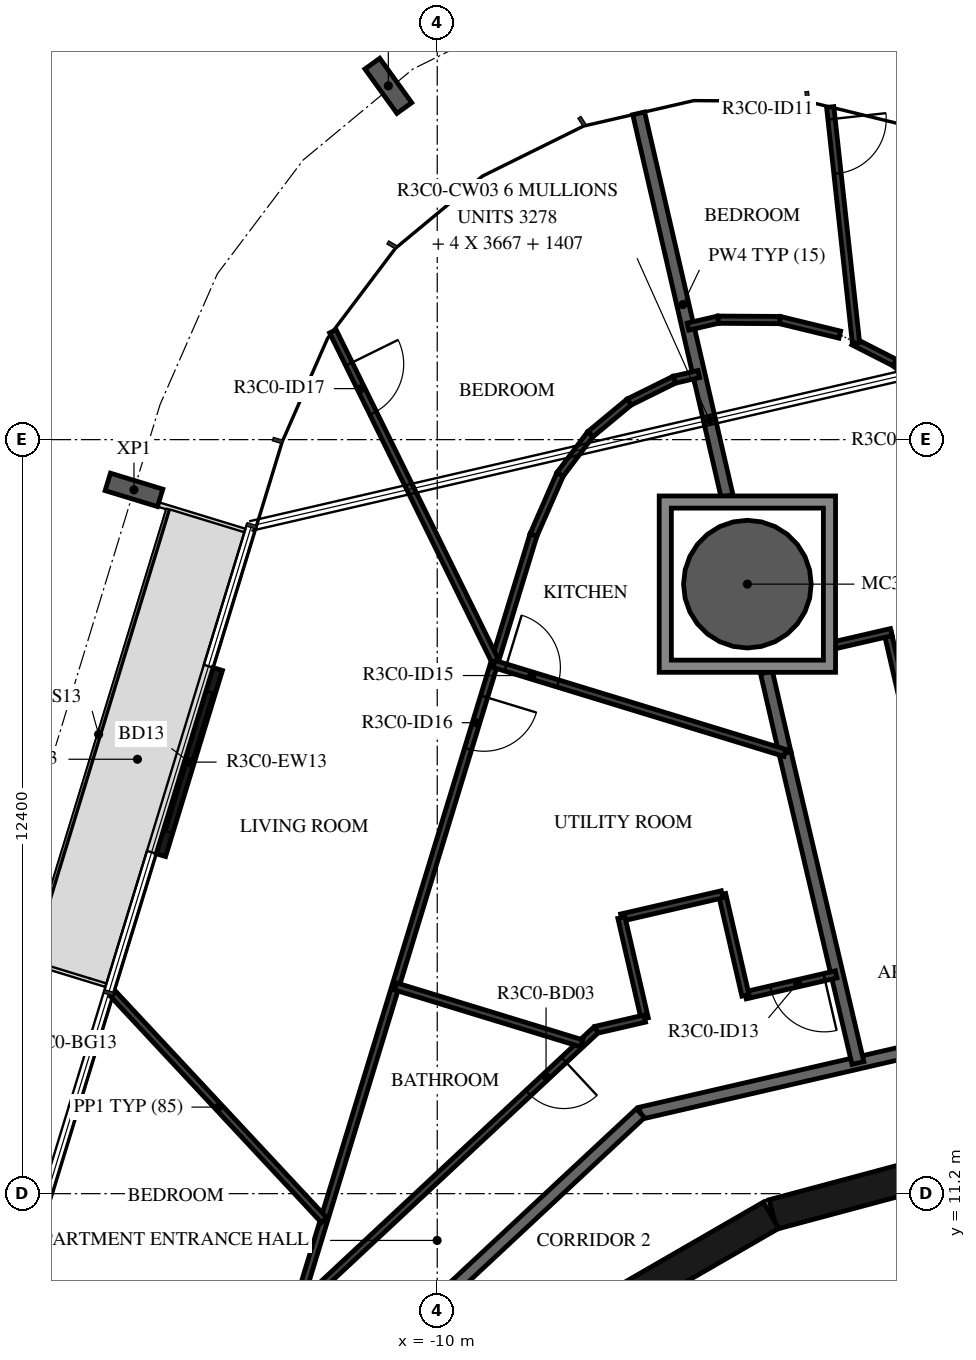
"""IFC4 building model, lengths in metres.
Left out: names, types, materials, properties, quantities, classifications, styles, units other than length and angle.
Written with IfcOpenShell. Run it as: python <this file> out.ifc"""

import sys

from ifc_helpers import new_model, si_unit, direction, frame, frame_2d, origin, origin_2d, place, context, subcontext, project, spatial, polyline, rectangle, hollow_circle, i_section, outline, extrude, element, fill, save


model = new_model("IFC4")
c1 = context("Model", 3, precision=1e-05, world=origin(), true_north=direction((0.0, 1.0)))
c2 = subcontext(c1, "Body", "Model", "MODEL_VIEW")
j1 = project(units=[si_unit("LENGTHUNIT", "METRE"), si_unit("PLANEANGLEUNIT", "RADIAN")], contexts=[c1])
p1 = place(None, origin())
s1 = spatial("IfcSite", under=j1, at=p1, CompositionType="ELEMENT")
p2 = place(p1, origin())
s2 = spatial("IfcBuilding", under=s1, at=p2, CompositionType="ELEMENT")
p3 = place(p2, frame((0.0, 0.0, 141.4)))
s3 = spatial("IfcBuildingStorey", under=s2, at=p3, CompositionType="ELEMENT", Elevation=141.4)
p4 = place(p3, frame((-4.9, 21.223, -0.38), z_axis=(0.0, 0.0, 1.0), x_axis=(1.0, 0.0, 0.0)))
e1 = element("IfcColumn", 1, at=p4, inside=s3, PredefinedType="COLUMN", context=c2, shape_type="SweptSolid", body=[
    extrude(hollow_circle(Radius=1.05, WallThickness=0.05, at=origin_2d()), origin(), (0.0, 0.0, 1.0), 2.576),
])
for number, where, z_axis, x_axis in (
    (2, (-10.804, 29.418, -0.38), (0.0, 0.0, 1.0), (0.811, 0.585, 0.0)),
    (3, (-14.987, 22.773, -0.38), (0.0, 0.0, 1.0), (0.292, 0.956, 0.0)),
):
    element("IfcColumn", number, at=place(p3, frame(where, z_axis=z_axis, x_axis=x_axis)), inside=s3, PredefinedType="COLUMN", context=c2, shape_type="SweptSolid", body=[
        extrude(i_section(OverallWidth=0.3, OverallDepth=0.9, WebThickness=0.019, FlangeThickness=0.035, FilletRadius=0.03, at=origin_2d()), origin(), (0.0, 0.0, 1.0), 2.616),
    ])
p5 = place(p3, frame((-13.609, 19.827, 0.0), z_axis=(0.0, 0.0, 1.0), x_axis=(-0.292348395078, -0.956311882126, 0.0)))
e4 = element("IfcWall", 4, at=p5, inside=s3, PredefinedType="STANDARD", context=c2, shape_type="SweptSolid", body=[
    extrude(rectangle(XDim=3.2, YDim=0.16, at=frame_2d((1.6, 0.0))), origin(), (0.0, 0.0, 1.0), 3.05),
])
p6 = place(p5, frame((0.4, 0.0, 0.0)))
e5 = element("IfcOpeningElement", 5, at=p6, cuts=e4, PredefinedType="OPENING", context=c2, shape_type="SweptSolid", body=[
    extrude(rectangle(XDim=2.4, YDim=2.4, at=frame_2d((1.2, 1.2))), frame((0.0, 0.09, 0.0), z_axis=(0.0, -1.0, 0.0), x_axis=(1.0, 0.0, 0.0)), (0.0, 0.0, 1.0), 0.18),
])
for number, where, z_axis, x_axis in (
    (6, (-1.55, 11.643, 0.0), (0.0, 0.0, 1.0), (-0.966, -0.259, 0.0)),
    (7, (-4.51, 10.845, 0.0), (0.0, 0.0, 1.0), (-0.866, -0.5, 0.0)),
):
    element("IfcWall", number, at=place(p3, frame(where, z_axis=z_axis, x_axis=x_axis)), inside=s3, PredefinedType="SHEAR", context=c2, shape_type="SweptSolid", body=[
        extrude(rectangle(XDim=3.033, YDim=0.5, at=frame_2d((1.516, 0.0))), origin(), (0.0, 0.0, 1.0), 3.05),
    ])
p7 = place(p3, frame((0.495, 14.175, 0.0), z_axis=(0.0, 0.0, 1.0), x_axis=(-0.974376622151, -0.224922649383, 0.0)))
e8 = element("IfcWall", 8, at=p7, inside=s3, PredefinedType="STANDARD", context=c2, shape_type="SweptSolid", body=[
    extrude(rectangle(XDim=7.342, YDim=0.2, at=frame_2d((3.671, 0.0))), origin(), (0.0, 0.0, 1.0), 3.05),
])
p8 = place(p3, frame((-6.659, 12.523, 0.0), z_axis=(0.0, 0.0, 1.0), x_axis=(-0.731350455479, -0.682001841105, 0.0)))
e9 = element("IfcWall", 9, at=p8, inside=s3, PredefinedType="STANDARD", context=c2, shape_type="SweptSolid", body=[
    extrude(rectangle(XDim=7.342, YDim=0.2, at=frame_2d((3.671, 0.0))), origin(), (0.0, 0.0, 1.0), 3.05),
])
p9 = place(p8, frame((4.2, 0.0, 0.0)))
e10 = element("IfcOpeningElement", 10, at=p9, cuts=e9, PredefinedType="OPENING", context=c2, shape_type="SweptSolid", body=[
    extrude(rectangle(XDim=1.0, YDim=2.1, at=frame_2d((0.5, 1.05))), frame((0.0, 0.11, 0.0), z_axis=(0.0, -1.0, 0.0), x_axis=(1.0, 0.0, 0.0)), (0.0, 0.0, 1.0), 0.22),
])
p10 = place(p3, frame((-4.281, 18.448, 0.0), z_axis=(0.0, 0.0, 1.0), x_axis=(0.228867856942, -0.973457499873, 0.0)))
e11 = element("IfcWall", 11, at=p10, inside=s3, PredefinedType="STANDARD", context=c2, shape_type="SweptSolid", body=[
    extrude(rectangle(XDim=5.238, YDim=0.2, at=frame_2d((2.619, 0.0))), origin(), (0.0, 0.0, 1.0), 3.05),
])
p11 = place(p3, frame((-4.586, 19.771, 0.0), z_axis=(0.0, 0.0, 1.0), x_axis=(0.224898895484, -0.974382105136, 0.0)))
e12 = element("IfcWall", 12, at=p11, inside=s3, PredefinedType="STANDARD", context=c2, shape_type="SweptSolid", body=[
    extrude(rectangle(XDim=1.358, YDim=0.2, at=frame_2d((0.679, 0.0))), origin(), (0.0, 0.0, 1.0), 3.05),
])
p12 = place(p3, frame((-6.687, 28.966, 0.0), z_axis=(0.0, 0.0, 1.0), x_axis=(0.224945100086, -0.974371439415, 0.0)))
e13 = element("IfcWall", 13, at=p12, inside=s3, PredefinedType="STANDARD", context=c2, shape_type="SweptSolid", body=[
    extrude(rectangle(XDim=6.458, YDim=0.2, at=frame_2d((3.229, 0.0))), origin(), (0.0, 0.0, 1.0), 3.05),
])
p13 = place(p3, frame((-1.404, 15.276, 0.0), z_axis=(0.0, 0.0, 1.0), x_axis=(-0.224947305813, 0.974370930194, 0.0)))
e14 = element("IfcWall", 14, at=p13, inside=s3, PredefinedType="PARTITIONING", context=c2, shape_type="SweptSolid", body=[
    extrude(rectangle(XDim=5.28, YDim=0.12, at=frame_2d((2.64, 0.0))), origin(), (0.0, 0.0, 1.0), 3.05),
])
p14 = place(p3, frame((-2.533, 20.434, 0.0), z_axis=(0.0, 0.0, 1.0), x_axis=(-0.974387124574, -0.224877147491, 0.0)))
e15 = element("IfcWall", 15, at=p14, inside=s3, PredefinedType="PARTITIONING", context=c2, shape_type="SweptSolid", body=[
    extrude(rectangle(XDim=1.011, YDim=0.12, at=frame_2d((0.505, 0.0))), origin(), (0.0, 0.0, 1.0), 3.05),
])
p15 = place(p3, frame((-3.156, 25.212, 0.0), z_axis=(0.0, 0.0, 1.0), x_axis=(0.890954246936, -0.454093085025, 0.0)))
e16 = element("IfcWall", 16, at=p15, inside=s3, PredefinedType="PARTITIONING", context=c2, shape_type="SweptSolid", body=[
    extrude(rectangle(XDim=0.765, YDim=0.12, at=frame_2d((0.383, 0.0))), origin(), (0.0, 0.0, 1.0), 3.05),
])
p16 = place(p3, frame((-2.474, 24.865, 0.0), z_axis=(0.0, 0.0, 1.0), x_axis=(0.762351487461, -0.647163201647, 0.0)))
e17 = element("IfcWall", 17, at=p16, inside=s3, PredefinedType="PARTITIONING", context=c2, shape_type="SweptSolid", body=[
    extrude(rectangle(XDim=1.227, YDim=0.12, at=frame_2d((0.614, 0.0))), origin(), (0.0, 0.0, 1.0), 3.05),
])
p17 = place(p3, frame((-3.538, 29.07, 0.0), z_axis=(0.0, 0.0, 1.0), x_axis=(0.1087420482, -0.994070001033, 0.0)))
e18 = element("IfcWall", 18, at=p17, inside=s3, PredefinedType="PARTITIONING", context=c2, shape_type="SweptSolid", body=[
    extrude(rectangle(XDim=3.902, YDim=0.12, at=frame_2d((1.951, 0.0))), origin(), (0.0, 0.0, 1.0), 3.05),
])
p18 = place(p17, frame((0.2, 0.0, 0.0)))
e19 = element("IfcOpeningElement", 19, at=p18, cuts=e18, PredefinedType="OPENING", context=c2, shape_type="SweptSolid", body=[
    extrude(rectangle(XDim=0.9, YDim=2.1, at=frame_2d((0.45, 1.05))), frame((0.0, 0.07, 0.0), z_axis=(0.0, -1.0, 0.0), x_axis=(1.0, 0.0, 0.0)), (0.0, 0.0, 1.0), 0.14),
])
p19 = place(p3, frame((-3.379, 25.326, 0.0), z_axis=(0.0, 0.0, 1.0), x_axis=(-0.971704876381, 0.236198292157, 0.0)))
e20 = element("IfcWall", 20, at=p19, inside=s3, PredefinedType="PARTITIONING", context=c2, shape_type="SweptSolid", body=[
    extrude(rectangle(XDim=1.016, YDim=0.12, at=frame_2d((0.508, 0.0))), origin(), (0.0, 0.0, 1.0), 3.05),
])
p20 = place(p3, frame((-4.367, 25.566, 0.0), z_axis=(0.0, 0.0, 1.0), x_axis=(-0.999983366401, 0.005767748328, 0.0)))
e21 = element("IfcWall", 21, at=p20, inside=s3, PredefinedType="PARTITIONING", context=c2, shape_type="SweptSolid", body=[
    extrude(rectangle(XDim=1.016, YDim=0.12, at=frame_2d((0.508, 0.0))), origin(), (0.0, 0.0, 1.0), 3.05),
])
p21 = place(p3, frame((-5.383, 25.572, 0.0), z_axis=(0.0, 0.0, 1.0), x_axis=(-0.974366885246, -0.224964825997, 0.0)))
e22 = element("IfcWall", 22, at=p21, inside=s3, PredefinedType="PARTITIONING", context=c2, shape_type="SweptSolid", body=[
    extrude(rectangle(XDim=0.508, YDim=0.12, at=frame_2d((0.254, 0.0))), origin(), (0.0, 0.0, 1.0), 3.05),
])
p22 = place(p3, frame((-3.44, 14.806, 0.0), z_axis=(0.0, 0.0, 1.0), x_axis=(-0.974356244071, -0.225010910046, 0.0)))
e23 = element("IfcWall", 23, at=p22, inside=s3, PredefinedType="PARTITIONING", context=c2, shape_type="SweptSolid", body=[
    extrude(rectangle(XDim=1.531, YDim=0.12, at=frame_2d((0.766, 0.0))), origin(), (0.0, 0.0, 1.0), 3.05),
])
p23 = place(p22, frame((0.2, 0.0, 0.0)))
e24 = element("IfcOpeningElement", 24, at=p23, cuts=e23, PredefinedType="OPENING", context=c2, shape_type="SweptSolid", body=[
    extrude(rectangle(XDim=0.9, YDim=2.1, at=frame_2d((0.45, 1.05))), frame((0.0, 0.07, 0.0), z_axis=(0.0, -1.0, 0.0), x_axis=(1.0, 0.0, 0.0)), (0.0, 0.0, 1.0), 0.14),
])
p24 = place(p3, frame((-4.931, 14.461, 0.0), z_axis=(0.0, 0.0, 1.0), x_axis=(-0.224911785629, 0.974379129849, 0.0)))
e25 = element("IfcWall", 25, at=p24, inside=s3, PredefinedType="PARTITIONING", context=c2, shape_type="SweptSolid", body=[
    extrude(rectangle(XDim=1.705, YDim=0.12, at=frame_2d((0.853, 0.0))), origin(), (0.0, 0.0, 1.0), 3.05),
])
p25 = place(p3, frame((-5.315, 16.123, 0.0), z_axis=(0.0, 0.0, 1.0), x_axis=(-0.974352456598, -0.225027310168, 0.0)))
e26 = element("IfcWall", 26, at=p25, inside=s3, PredefinedType="PARTITIONING", context=c2, shape_type="SweptSolid", body=[
    extrude(rectangle(XDim=1.7, YDim=0.12, at=frame_2d((0.85, 0.0))), origin(), (0.0, 0.0, 1.0), 3.05),
])
p26 = place(p3, frame((-6.971, 15.74, 0.0), z_axis=(0.0, 0.0, 1.0), x_axis=(0.224943164347, -0.974371886301, 0.0)))
e27 = element("IfcWall", 27, at=p26, inside=s3, PredefinedType="PARTITIONING", context=c2, shape_type="SweptSolid", body=[
    extrude(rectangle(XDim=1.705, YDim=0.12, at=frame_2d((0.853, 0.0))), origin(), (0.0, 0.0, 1.0), 3.05),
])
p27 = place(p3, frame((-6.588, 14.079, 0.0), z_axis=(0.0, 0.0, 1.0), x_axis=(-0.974391195695, -0.224859506699, 0.0)))
e28 = element("IfcWall", 28, at=p27, inside=s3, PredefinedType="PARTITIONING", context=c2, shape_type="SweptSolid", body=[
    extrude(rectangle(XDim=0.821, YDim=0.12, at=frame_2d((0.41, 0.0))), origin(), (0.0, 0.0, 1.0), 3.05),
])
p28 = place(p3, frame((-7.388, 13.894, 0.0), z_axis=(0.0, 0.0, 1.0), x_axis=(-0.731357186721, -0.681994622729, 0.0)))
e29 = element("IfcWall", 29, at=p28, inside=s3, PredefinedType="PARTITIONING", context=c2, shape_type="SweptSolid", body=[
    extrude(rectangle(XDim=8.146, YDim=0.12, at=frame_2d((4.073, 0.0))), origin(), (0.0, 0.0, 1.0), 3.05),
])
p29 = place(p28, frame((0.725, 0.0, 0.0)))
e30 = element("IfcOpeningElement", 30, at=p29, cuts=e29, PredefinedType="OPENING", context=c2, shape_type="SweptSolid", body=[
    extrude(rectangle(XDim=0.8, YDim=2.1, at=frame_2d((0.4, 1.05))), frame((0.0, 0.07, 0.0), z_axis=(0.0, -1.0, 0.0), x_axis=(1.0, 0.0, 0.0)), (0.0, 0.0, 1.0), 0.14),
])
p30 = place(p28, frame((6.927, 0.0, 0.0)))
e31 = element("IfcOpeningElement", 31, at=p30, cuts=e29, PredefinedType="OPENING", context=c2, shape_type="SweptSolid", body=[
    extrude(rectangle(XDim=0.9, YDim=2.1, at=frame_2d((0.45, 1.05))), frame((0.0, 0.07, 0.0), z_axis=(0.0, -1.0, 0.0), x_axis=(1.0, 0.0, 0.0)), (0.0, 0.0, 1.0), 0.14),
])
p31 = place(p3, frame((-5.698, 24.679, 0.0), z_axis=(0.0, 0.0, 1.0), x_axis=(-0.974222160042, -0.225590742017, 0.0)))
e32 = element("IfcWall", 32, at=p31, inside=s3, PredefinedType="PARTITIONING", context=c2, shape_type="SweptSolid", body=[
    extrude(rectangle(XDim=0.415, YDim=0.12, at=frame_2d((0.207, 0.0))), origin(), (0.0, 0.0, 1.0), 3.05),
])
p32 = place(p3, frame((-6.101, 24.585, 0.0), z_axis=(0.0, 0.0, 1.0), x_axis=(-0.896362871824, -0.443321104862, 0.0)))
e33 = element("IfcWall", 33, at=p32, inside=s3, PredefinedType="PARTITIONING", context=c2, shape_type="SweptSolid", body=[
    extrude(rectangle(XDim=0.829, YDim=0.12, at=frame_2d((0.415, 0.0))), origin(), (0.0, 0.0, 1.0), 3.05),
])
p33 = place(p3, frame((-6.844, 24.218, 0.0), z_axis=(0.0, 0.0, 1.0), x_axis=(-0.769715611418, -0.63838693403, 0.0)))
e34 = element("IfcWall", 34, at=p33, inside=s3, PredefinedType="PARTITIONING", context=c2, shape_type="SweptSolid", body=[
    extrude(rectangle(XDim=0.829, YDim=0.12, at=frame_2d((0.415, 0.0))), origin(), (0.0, 0.0, 1.0), 3.05),
])
p34 = place(p3, frame((-7.482, 23.688, 0.0), z_axis=(0.0, 0.0, 1.0), x_axis=(-0.601836624867, -0.798619231529, 0.0)))
e35 = element("IfcWall", 35, at=p34, inside=s3, PredefinedType="PARTITIONING", context=c2, shape_type="SweptSolid", body=[
    extrude(rectangle(XDim=0.829, YDim=0.12, at=frame_2d((0.415, 0.0))), origin(), (0.0, 0.0, 1.0), 3.05),
])
p35 = place(p3, frame((-7.981, 23.027, 0.0), z_axis=(0.0, 0.0, 1.0), x_axis=(-0.401360750198, -0.915920055573, 0.0)))
e36 = element("IfcWall", 36, at=p35, inside=s3, PredefinedType="PARTITIONING", context=c2, shape_type="SweptSolid", body=[
    extrude(rectangle(XDim=1.087, YDim=0.12, at=frame_2d((0.543, 0.0))), origin(), (0.0, 0.0, 1.0), 3.05),
])
p36 = place(p3, frame((-8.417, 22.031, 0.0), z_axis=(0.0, 0.0, 1.0), x_axis=(-0.292371891841, -0.956304698755, 0.0)))
e37 = element("IfcWall", 37, at=p36, inside=s3, PredefinedType="PARTITIONING", context=c2, shape_type="SweptSolid", body=[
    extrude(rectangle(XDim=13.306, YDim=0.12, at=frame_2d((6.653, 0.0))), origin(), (0.0, 0.0, 1.0), 3.05),
])
p37 = place(p36, frame((2.777, 0.0, 0.0)))
e38 = element("IfcOpeningElement", 38, at=p37, cuts=e37, PredefinedType="OPENING", context=c2, shape_type="SweptSolid", body=[
    extrude(rectangle(XDim=0.9, YDim=2.1, at=frame_2d((0.45, 1.05))), frame((0.0, 0.07, 0.0), z_axis=(0.0, -1.0, 0.0), x_axis=(1.0, 0.0, 0.0)), (0.0, 0.0, 1.0), 0.14),
])
p38 = place(p3, frame((-9.066, 19.91, 0.0), z_axis=(0.0, 0.0, 1.0), x_axis=(0.956313309797, -0.292343724928, 0.0)))
e39 = element("IfcWall", 39, at=p38, inside=s3, PredefinedType="PARTITIONING", context=c2, shape_type="SweptSolid", body=[
    extrude(rectangle(XDim=5.004, YDim=0.12, at=frame_2d((2.502, 0.0))), origin(), (0.0, 0.0, 1.0), 3.05),
])
p39 = place(p38, frame((0.2, 0.0, 0.0)))
e40 = element("IfcOpeningElement", 40, at=p39, cuts=e39, PredefinedType="OPENING", context=c2, shape_type="SweptSolid", body=[
    extrude(rectangle(XDim=0.9, YDim=2.1, at=frame_2d((0.45, 1.05))), frame((0.0, 0.07, 0.0), z_axis=(0.0, -1.0, 0.0), x_axis=(1.0, 0.0, 0.0)), (0.0, 0.0, 1.0), 0.14),
])
p40 = place(p3, frame((-11.716, 25.381, 0.0), z_axis=(0.0, 0.0, 1.0), x_axis=(0.441576881221, -0.897223415862, 0.0)))
e41 = element("IfcWall", 41, at=p40, inside=s3, PredefinedType="PARTITIONING", context=c2, shape_type="SweptSolid", body=[
    extrude(rectangle(XDim=6.039, YDim=0.12, at=frame_2d((3.019, 0.0))), origin(), (0.0, 0.0, 1.0), 3.05),
])
p41 = place(p40, frame((0.6, 0.0, 0.0)))
e42 = element("IfcOpeningElement", 42, at=p41, cuts=e41, PredefinedType="OPENING", context=c2, shape_type="SweptSolid", body=[
    extrude(rectangle(XDim=0.9, YDim=2.1, at=frame_2d((0.45, 1.05))), frame((0.0, 0.07, 0.0), z_axis=(0.0, -1.0, 0.0), x_axis=(1.0, 0.0, 0.0)), (0.0, 0.0, 1.0), 0.14),
])
p42 = place(p3, frame((-10.687, 14.608, 0.0), z_axis=(0.0, 0.0, 1.0), x_axis=(0.956295309419, -0.292402601189, 0.0)))
e43 = element("IfcWall", 43, at=p42, inside=s3, PredefinedType="PARTITIONING", context=c2, shape_type="SweptSolid", body=[
    extrude(rectangle(XDim=3.201, YDim=0.12, at=frame_2d((1.601, 0.0))), origin(), (0.0, 0.0, 1.0), 3.05),
])
p43 = place(p3, frame((-15.327, 14.481, 0.0), z_axis=(0.0, 0.0, 1.0), x_axis=(0.68197575128, -0.731374783997, 0.0)))
e44 = element("IfcWall", 44, at=p43, inside=s3, PredefinedType="PARTITIONING", context=c2, shape_type="SweptSolid", body=[
    extrude(rectangle(XDim=5.081, YDim=0.12, at=frame_2d((2.54, 0.0))), origin(), (0.0, 0.0, 1.0), 3.05),
])
p44 = place(p3, origin())
e45 = element("IfcWall", 45, at=p44, inside=s3, PredefinedType="STANDARD", context=c2, shape_type="SweptSolid", body=[
    extrude(outline(polyline([(-3.45, 22.674), (-3.45, 19.773), (-6.35, 19.773), (-6.35, 22.674), (-3.45, 22.674)]), holes=[polyline([(-6.15, 19.973), (-3.65, 19.973), (-3.65, 22.473), (-6.15, 22.473), (-6.15, 19.973)])]), origin(), (0.0, 0.0, 1.0), 3.05),
])
p45 = place(p6, origin())
e46 = element("IfcDoor", 46, at=p45, inside=s3, OperationType="DOUBLE_DOOR_SLIDING", PredefinedType="DOOR", context=c2, shape_type="SweptSolid", body=[
    extrude(rectangle(XDim=2.4, YDim=2.4, at=frame_2d((1.2, 1.2))), frame((0.0, 0.025, 0.0), z_axis=(0.0, -1.0, 0.0), x_axis=(1.0, 0.0, 0.0)), (0.0, 0.0, 1.0), 0.05),
])
fill(e5, e46)
p46 = place(p18, origin())
e47 = element("IfcDoor", 47, at=p46, inside=s3, OperationType="SINGLE_SWING_RIGHT", PredefinedType="DOOR", context=c2, shape_type="SweptSolid", body=[
    extrude(rectangle(XDim=0.9, YDim=2.1, at=frame_2d((0.45, 1.05))), frame((0.0, 0.025, 0.0), z_axis=(0.0, -1.0, 0.0), x_axis=(1.0, 0.0, 0.0)), (0.0, 0.0, 1.0), 0.05),
])
fill(e19, e47)
p47 = place(p23, origin())
e48 = element("IfcDoor", 48, at=p47, inside=s3, OperationType="SINGLE_SWING_LEFT", PredefinedType="DOOR", context=c2, shape_type="SweptSolid", body=[
    extrude(rectangle(XDim=0.9, YDim=2.1, at=frame_2d((0.45, 1.05))), frame((0.0, 0.025, 0.0), z_axis=(0.0, -1.0, 0.0), x_axis=(1.0, 0.0, 0.0)), (0.0, 0.0, 1.0), 0.05),
])
fill(e24, e48)
p48 = place(p29, origin())
e49 = element("IfcDoor", 49, at=p48, inside=s3, OperationType="SINGLE_SWING_LEFT", PredefinedType="DOOR", context=c2, shape_type="SweptSolid", body=[
    extrude(rectangle(XDim=0.8, YDim=2.1, at=frame_2d((0.4, 1.05))), frame((0.0, 0.025, 0.0), z_axis=(0.0, -1.0, 0.0), x_axis=(1.0, 0.0, 0.0)), (0.0, 0.0, 1.0), 0.05),
])
fill(e30, e49)
p49 = place(p39, origin())
e50 = element("IfcDoor", 50, at=p49, inside=s3, OperationType="SINGLE_SWING_LEFT", PredefinedType="DOOR", context=c2, shape_type="SweptSolid", body=[
    extrude(rectangle(XDim=0.9, YDim=2.1, at=frame_2d((0.45, 1.05))), frame((0.0, 0.025, 0.0), z_axis=(0.0, -1.0, 0.0), x_axis=(1.0, 0.0, 0.0)), (0.0, 0.0, 1.0), 0.05),
])
fill(e40, e50)
p50 = place(p37, origin())
e51 = element("IfcDoor", 51, at=p50, inside=s3, OperationType="SINGLE_SWING_LEFT", PredefinedType="DOOR", context=c2, shape_type="SweptSolid", body=[
    extrude(rectangle(XDim=0.9, YDim=2.1, at=frame_2d((0.45, 1.05))), frame((0.0, 0.025, 0.0), z_axis=(0.0, -1.0, 0.0), x_axis=(1.0, 0.0, 0.0)), (0.0, 0.0, 1.0), 0.05),
])
fill(e38, e51)
p51 = place(p41, origin())
e52 = element("IfcDoor", 52, at=p51, inside=s3, OperationType="SINGLE_SWING_LEFT", PredefinedType="DOOR", context=c2, shape_type="SweptSolid", body=[
    extrude(rectangle(XDim=0.9, YDim=2.1, at=frame_2d((0.45, 1.05))), frame((0.0, 0.025, 0.0), z_axis=(0.0, -1.0, 0.0), x_axis=(1.0, 0.0, 0.0)), (0.0, 0.0, 1.0), 0.05),
])
fill(e42, e52)
save(model, sys.argv[1])
